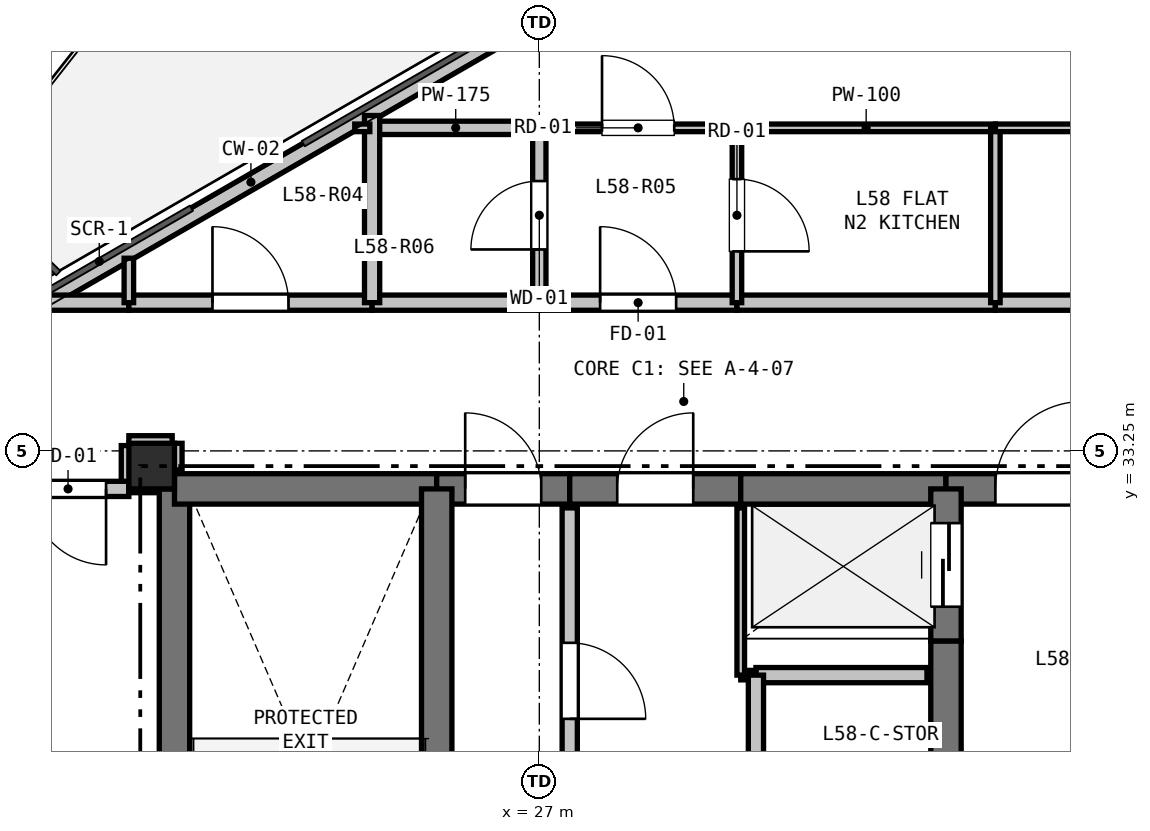
"""IFC4 building model, lengths in metres.
Left out: names, types, materials, properties, quantities, classifications, styles, units other than length and angle.
Written with IfcOpenShell. Run it as: python <this file> out.ifc"""

import sys

from ifc_helpers import new_model, si_unit, direction, frame, frame_2d, origin, origin_2d, place, context, subcontext, project, spatial, rectangle, extrude, element, fill, save


model = new_model("IFC4")
c1 = context("Model", 3, precision=1e-05, world=origin(), true_north=direction((0.0, 1.0)))
c2 = subcontext(c1, "Body", "Model", "MODEL_VIEW")
j1 = project(units=[si_unit("LENGTHUNIT", "METRE"), si_unit("PLANEANGLEUNIT", "RADIAN")], contexts=[c1])
p1 = place(None, origin())
s1 = spatial("IfcSite", under=j1, at=p1, CompositionType="ELEMENT")
p2 = place(p1, origin())
s2 = spatial("IfcBuilding", under=s1, at=p2, CompositionType="ELEMENT")
p3 = place(p2, frame((0.0, 0.0, 208.5)))
s3 = spatial("IfcBuildingStorey", under=s2, at=p3, CompositionType="ELEMENT", Elevation=208.5)
p4 = place(p3, frame((21.9, 33.05, 0.0), z_axis=(0.0, 0.0, 1.0), x_axis=(1.0, 0.0, 0.0)))
e1 = element("IfcColumn", 1, at=p4, inside=s3, PredefinedType="COLUMN", context=c2, shape_type="SweptSolid", body=[
    extrude(rectangle(XDim=0.6, YDim=0.6, at=origin_2d()), origin(), (0.0, 0.0, 1.0), 3.3),
])
p5 = place(p3, frame((19.309, 34.536, 0.0), z_axis=(0.0, 0.0, 1.0), x_axis=(0.866020680503, 0.500008180874, 0.0)))
e2 = element("IfcWall", 2, at=p5, inside=s3, PredefinedType="PARAPET", context=c2, shape_type="SweptSolid", body=[
    extrude(rectangle(XDim=8.999, YDim=0.2, at=frame_2d((4.5, 0.0))), origin(), (0.0, 0.0, 1.0), 0.2),
])
p6 = place(p3, frame((22.2, 25.4, 0.0), z_axis=(0.0, 0.0, 1.0), x_axis=(0.0, 1.0, 0.0)))
e3 = element("IfcWall", 3, at=p6, inside=s3, PredefinedType="SHEAR", context=c2, shape_type="SweptSolid", body=[
    extrude(rectangle(XDim=7.35, YDim=0.4, at=frame_2d((3.675, 0.0))), origin(), (0.0, 0.0, 1.0), 3.07),
])
p7 = place(p3, frame((22.2, 32.75, 0.0), z_axis=(0.0, 0.0, 1.0), x_axis=(1.0, 0.0, 0.0)))
e4 = element("IfcWall", 4, at=p7, inside=s3, PredefinedType="SHEAR", context=c2, shape_type="SweptSolid", body=[
    extrude(rectangle(XDim=3.45, YDim=0.4, at=frame_2d((1.725, 0.0))), origin(), (0.0, 0.0, 1.0), 3.07),
])
p8 = place(p3, frame((25.65, 32.75, 0.0), z_axis=(0.0, 0.0, 1.0), x_axis=(1.0, 0.0, 0.0)))
e5 = element("IfcWall", 5, at=p8, inside=s3, PredefinedType="SHEAR", context=c2, shape_type="SweptSolid", body=[
    extrude(rectangle(XDim=1.75, YDim=0.4, at=frame_2d((0.875, 0.0))), origin(), (0.0, 0.0, 1.0), 3.07),
])
p9 = place(p8, frame((0.375, 0.0, 0.0)))
e6 = element("IfcOpeningElement", 6, at=p9, cuts=e5, PredefinedType="OPENING", context=c2, shape_type="SweptSolid", body=[
    extrude(rectangle(XDim=1.0, YDim=2.15, at=frame_2d((0.5, 1.075))), frame((0.0, 0.21, 0.0), z_axis=(0.0, -1.0, 0.0), x_axis=(1.0, 0.0, 0.0)), (0.0, 0.0, 1.0), 0.42),
])
p10 = place(p3, frame((27.4, 32.75, 0.0), z_axis=(0.0, 0.0, 1.0), x_axis=(1.0, 0.0, 0.0)))
e7 = element("IfcWall", 7, at=p10, inside=s3, PredefinedType="SHEAR", context=c2, shape_type="SweptSolid", body=[
    extrude(rectangle(XDim=2.25, YDim=0.4, at=frame_2d((1.125, 0.0))), origin(), (0.0, 0.0, 1.0), 3.07),
])
p11 = place(p10, frame((0.625, 0.0, 0.0)))
e8 = element("IfcOpeningElement", 8, at=p11, cuts=e7, PredefinedType="OPENING", context=c2, shape_type="SweptSolid", body=[
    extrude(rectangle(XDim=1.0, YDim=2.15, at=frame_2d((0.5, 1.075))), frame((0.0, 0.21, 0.0), z_axis=(0.0, -1.0, 0.0), x_axis=(1.0, 0.0, 0.0)), (0.0, 0.0, 1.0), 0.42),
])
p12 = place(p3, frame((29.65, 32.75, 0.0), z_axis=(0.0, 0.0, 1.0), x_axis=(1.0, 0.0, 0.0)))
e9 = element("IfcWall", 9, at=p12, inside=s3, PredefinedType="SHEAR", context=c2, shape_type="SweptSolid", body=[
    extrude(rectangle(XDim=2.7, YDim=0.4, at=frame_2d((1.35, 0.0))), origin(), (0.0, 0.0, 1.0), 3.07),
])
p13 = place(p3, frame((32.35, 32.75, 0.0), z_axis=(0.0, 0.0, 1.0), x_axis=(1.0, 0.0, 0.0)))
e10 = element("IfcWall", 10, at=p13, inside=s3, PredefinedType="SHEAR", context=c2, shape_type="SweptSolid", body=[
    extrude(rectangle(XDim=3.45, YDim=0.4, at=frame_2d((1.725, 0.0))), origin(), (0.0, 0.0, 1.0), 3.07),
])
p14 = place(p13, frame((0.65, 0.0, 0.0)))
e11 = element("IfcOpeningElement", 11, at=p14, cuts=e10, PredefinedType="OPENING", context=c2, shape_type="SweptSolid", body=[
    extrude(rectangle(XDim=1.15, YDim=2.15, at=frame_2d((0.575, 1.075))), frame((0.0, 0.21, 0.0), z_axis=(0.0, -1.0, 0.0), x_axis=(1.0, 0.0, 0.0)), (0.0, 0.0, 1.0), 0.42),
])
p15 = place(p3, frame((25.65, 27.95, 0.0), z_axis=(0.0, 0.0, 1.0), x_axis=(0.0, 1.0, 0.0)))
e12 = element("IfcWall", 12, at=p15, inside=s3, PredefinedType="SHEAR", context=c2, shape_type="SweptSolid", body=[
    extrude(rectangle(XDim=4.8, YDim=0.4, at=frame_2d((2.4, 0.0))), origin(), (0.0, 0.0, 1.0), 3.07),
])
p16 = place(p3, frame((32.35, 27.95, 0.0), z_axis=(0.0, 0.0, 1.0), x_axis=(0.0, 1.0, 0.0)))
e13 = element("IfcWall", 13, at=p16, inside=s3, PredefinedType="SHEAR", context=c2, shape_type="SweptSolid", body=[
    extrude(rectangle(XDim=2.8, YDim=0.4, at=frame_2d((1.4, 0.0))), origin(), (0.0, 0.0, 1.0), 3.07),
])
p17 = place(p3, frame((32.35, 30.75, 0.0), z_axis=(0.0, 0.0, 1.0), x_axis=(0.0, 1.0, 0.0)))
e14 = element("IfcWall", 14, at=p17, inside=s3, PredefinedType="SHEAR", context=c2, shape_type="SweptSolid", body=[
    extrude(rectangle(XDim=2.0, YDim=0.4, at=frame_2d((1.0, 0.0))), origin(), (0.0, 0.0, 1.0), 3.07),
])
p18 = place(p17, frame((0.45, 0.0, 0.0)))
e15 = element("IfcOpeningElement", 15, at=p18, cuts=e14, PredefinedType="OPENING", context=c2, shape_type="SweptSolid", body=[
    extrude(rectangle(XDim=1.1, YDim=2.15, at=frame_2d((0.55, 1.075))), frame((0.0, 0.21, 0.0), z_axis=(0.0, -1.0, 0.0), x_axis=(1.0, 0.0, 0.0)), (0.0, 0.0, 1.0), 0.42),
])
p19 = place(p3, frame((32.1, 30.3, 0.0), z_axis=(0.0, 0.0, 1.0), x_axis=(-1.0, 0.0, 0.0)))
e16 = element("IfcWall", 16, at=p19, inside=s3, PredefinedType="PARTITIONING", context=c2, shape_type="SweptSolid", body=[
    extrude(rectangle(XDim=2.25, YDim=0.2, at=frame_2d((1.125, 0.0))), origin(), (0.0, 0.0, 1.0), 3.07),
])
p20 = place(p3, frame((29.85, 30.3, 0.0), z_axis=(0.0, 0.0, 1.0), x_axis=(-1.0, 0.0, 0.0)))
e17 = element("IfcWall", 17, at=p20, inside=s3, PredefinedType="PARTITIONING", context=c2, shape_type="SweptSolid", body=[
    extrude(rectangle(XDim=0.2, YDim=0.125, at=frame_2d((0.1, 0.0))), origin(), (0.0, 0.0, 1.0), 3.07),
])
p21 = place(p3, frame((29.65, 30.3, 0.0), z_axis=(0.0, 0.0, 1.0), x_axis=(0.0, 1.0, 0.0)))
e18 = element("IfcWall", 18, at=p21, inside=s3, PredefinedType="PARTITIONING", context=c2, shape_type="SweptSolid", body=[
    extrude(rectangle(XDim=2.2, YDim=0.1, at=frame_2d((1.1, 0.0))), origin(), (0.0, 0.0, 1.0), 3.07),
])
p22 = place(p3, frame((27.4, 32.5, 0.0), z_axis=(0.0, 0.0, 1.0), x_axis=(0.0, -1.0, 0.0)))
e19 = element("IfcWall", 19, at=p22, inside=s3, PredefinedType="PARTITIONING", context=c2, shape_type="SweptSolid", body=[
    extrude(rectangle(XDim=4.55, YDim=0.2, at=frame_2d((2.275, 0.0))), origin(), (0.0, 0.0, 1.0), 3.07),
])
p23 = place(p22, frame((1.775, 0.0, 0.0)))
e20 = element("IfcOpeningElement", 20, at=p23, cuts=e19, PredefinedType="OPENING", context=c2, shape_type="SweptSolid", body=[
    extrude(rectangle(XDim=1.0, YDim=2.15, at=frame_2d((0.5, 1.075))), frame((0.0, 0.11, 0.0), z_axis=(0.0, -1.0, 0.0), x_axis=(1.0, 0.0, 0.0)), (0.0, 0.0, 1.0), 0.22),
])
p24 = place(p3, frame((22.2, 33.0, 0.0), z_axis=(0.0, 0.0, 1.0), x_axis=(0.0, 1.0, 0.0)))
e21 = element("IfcWall", 21, at=p24, inside=s3, PredefinedType="PARTITIONING", context=c2, shape_type="SweptSolid", body=[
    extrude(rectangle(XDim=0.35, YDim=0.2, at=frame_2d((0.175, 0.0))), origin(), (0.0, 0.0, 1.0), 2.595),
])
p25 = place(p3, frame((22.17, 33.35, 0.0), z_axis=(0.0, 0.0, 1.0), x_axis=(-1.0, 0.0, 0.0)))
e22 = element("IfcWall", 22, at=p25, inside=s3, PredefinedType="PARTITIONING", context=c2, shape_type="SweptSolid", body=[
    extrude(rectangle(XDim=0.57, YDim=0.2, at=frame_2d((0.285, 0.0))), origin(), (0.0, 0.0, 1.0), 3.07),
])
p26 = place(p3, frame((21.6, 33.32, 0.0), z_axis=(0.0, 0.0, 1.0), x_axis=(0.0, -1.0, 0.0)))
e23 = element("IfcWall", 23, at=p26, inside=s3, PredefinedType="PARTITIONING", context=c2, shape_type="SweptSolid", body=[
    extrude(rectangle(XDim=0.57, YDim=0.2, at=frame_2d((0.285, 0.0))), origin(), (0.0, 0.0, 1.0), 2.518),
])
p27 = place(p3, frame((21.6, 32.75, 0.0), z_axis=(0.0, 0.0, 1.0), x_axis=(-1.0, 0.0, 0.0)))
e24 = element("IfcWall", 24, at=p27, inside=s3, PredefinedType="PARTITIONING", context=c2, shape_type="SweptSolid", body=[
    extrude(rectangle(XDim=1.6, YDim=0.2, at=frame_2d((0.8, 0.0))), origin(), (0.0, 0.0, 1.0), 2.518),
])
p28 = place(p27, frame((0.3, 0.0, 0.0)))
e25 = element("IfcOpeningElement", 25, at=p28, cuts=e24, PredefinedType="OPENING", context=c2, shape_type="SweptSolid", body=[
    extrude(rectangle(XDim=1.0, YDim=2.15, at=frame_2d((0.5, 1.075))), frame((0.0, 0.11, 0.0), z_axis=(0.0, -1.0, 0.0), x_axis=(1.0, 0.0, 0.0)), (0.0, 0.0, 1.0), 0.22),
])
p29 = place(p3, frame((20.528, 35.2, 0.0), z_axis=(0.0, 0.0, 1.0), x_axis=(1.0, 0.0, 0.0)))
e26 = element("IfcWall", 26, at=p29, inside=s3, PredefinedType="PARTITIONING", context=c2, shape_type="SweptSolid", body=[
    extrude(rectangle(XDim=1.072, YDim=0.2, at=frame_2d((0.536, 0.0))), origin(), (0.0, 0.0, 1.0), 2.365),
])
p30 = place(p3, frame((21.6, 35.2, 0.0), z_axis=(0.0, 0.0, 1.0), x_axis=(1.0, 0.0, 0.0)))
e27 = element("IfcWall", 27, at=p30, inside=s3, PredefinedType="PARTITIONING", context=c2, shape_type="SweptSolid", body=[
    extrude(rectangle(XDim=3.2, YDim=0.2, at=frame_2d((1.6, 0.0))), origin(), (0.0, 0.0, 1.0), 2.365),
])
p31 = place(p30, frame((1.1, 0.0, 0.0)))
e28 = element("IfcOpeningElement", 28, at=p31, cuts=e27, PredefinedType="OPENING", context=c2, shape_type="SweptSolid", body=[
    extrude(rectangle(XDim=1.0, YDim=2.15, at=frame_2d((0.5, 1.075))), frame((0.0, 0.11, 0.0), z_axis=(0.0, -1.0, 0.0), x_axis=(1.0, 0.0, 0.0)), (0.0, 0.0, 1.0), 0.22),
])
p32 = place(p3, frame((24.8, 35.2, 0.0), z_axis=(0.0, 0.0, 1.0), x_axis=(1.0, 0.0, 0.0)))
e29 = element("IfcWall", 29, at=p32, inside=s3, PredefinedType="PARTITIONING", context=c2, shape_type="SweptSolid", body=[
    extrude(rectangle(XDim=2.2, YDim=0.2, at=frame_2d((1.1, 0.0))), origin(), (0.0, 0.0, 1.0), 3.07),
])
p33 = place(p3, frame((27.0, 35.2, 0.0), z_axis=(0.0, 0.0, 1.0), x_axis=(1.0, 0.0, 0.0)))
e30 = element("IfcWall", 30, at=p33, inside=s3, PredefinedType="PARTITIONING", context=c2, shape_type="SweptSolid", body=[
    extrude(rectangle(XDim=2.6, YDim=0.2, at=frame_2d((1.3, 0.0))), origin(), (0.0, 0.0, 1.0), 3.07),
])
p34 = place(p33, frame((0.8, 0.0, 0.0)))
e31 = element("IfcOpeningElement", 31, at=p34, cuts=e30, PredefinedType="OPENING", context=c2, shape_type="SweptSolid", body=[
    extrude(rectangle(XDim=1.0, YDim=2.15, at=frame_2d((0.5, 1.075))), frame((0.0, 0.11, 0.0), z_axis=(0.0, -1.0, 0.0), x_axis=(1.0, 0.0, 0.0)), (0.0, 0.0, 1.0), 0.22),
])
p35 = place(p3, frame((29.6, 35.2, 0.0), z_axis=(0.0, 0.0, 1.0), x_axis=(1.0, 0.0, 0.0)))
e32 = element("IfcWall", 32, at=p35, inside=s3, PredefinedType="PARTITIONING", context=c2, shape_type="SweptSolid", body=[
    extrude(rectangle(XDim=3.4, YDim=0.2, at=frame_2d((1.7, 0.0))), origin(), (0.0, 0.0, 1.0), 3.07),
])
p36 = place(p3, frame((33.0, 35.2, 0.0), z_axis=(0.0, 0.0, 1.0), x_axis=(1.0, 0.0, 0.0)))
e33 = element("IfcWall", 33, at=p36, inside=s3, PredefinedType="PARTITIONING", context=c2, shape_type="SweptSolid", body=[
    extrude(rectangle(XDim=1.5, YDim=0.2, at=frame_2d((0.75, 0.0))), origin(), (0.0, 0.0, 1.0), 3.07),
])
p37 = place(p3, frame((27.0, 37.5, 0.0), z_axis=(0.0, 0.0, 1.0), x_axis=(1.0, 0.0, 0.0)))
e34 = element("IfcWall", 34, at=p37, inside=s3, PredefinedType="PARTITIONING", context=c2, shape_type="SweptSolid", body=[
    extrude(rectangle(XDim=2.6, YDim=0.1, at=frame_2d((1.3, 0.0))), origin(), (0.0, 0.0, 1.0), 3.07),
])
p38 = place(p37, frame((0.825, 0.0, 0.0)))
e35 = element("IfcOpeningElement", 35, at=p38, cuts=e34, PredefinedType="OPENING", context=c2, shape_type="SweptSolid", body=[
    extrude(rectangle(XDim=0.95, YDim=2.1, at=frame_2d((0.475, 1.05))), frame((0.0, 0.06, 0.0), z_axis=(0.0, -1.0, 0.0), x_axis=(1.0, 0.0, 0.0)), (0.0, 0.0, 1.0), 0.12),
])
p39 = place(p3, frame((29.6, 37.5, 0.0), z_axis=(0.0, 0.0, 1.0), x_axis=(0.0, -1.0, 0.0)))
e36 = element("IfcWall", 36, at=p39, inside=s3, PredefinedType="PARTITIONING", context=c2, shape_type="SweptSolid", body=[
    extrude(rectangle(XDim=2.3, YDim=0.125, at=frame_2d((1.15, 0.0))), origin(), (0.0, 0.0, 1.0), 3.07),
])
p40 = place(p39, frame((0.675, 0.0, 0.0)))
e37 = element("IfcOpeningElement", 37, at=p40, cuts=e36, PredefinedType="OPENING", context=c2, shape_type="SweptSolid", body=[
    extrude(rectangle(XDim=0.95, YDim=2.1, at=frame_2d((0.475, 1.05))), frame((0.0, 0.073, 0.0), z_axis=(0.0, -1.0, 0.0), x_axis=(1.0, 0.0, 0.0)), (0.0, 0.0, 1.0), 0.145),
])
p41 = place(p3, frame((27.0, 35.2, 0.0), z_axis=(0.0, 0.0, 1.0), x_axis=(0.0, 1.0, 0.0)))
e38 = element("IfcWall", 38, at=p41, inside=s3, PredefinedType="PLUMBINGWALL", context=c2, shape_type="SweptSolid", body=[
    extrude(rectangle(XDim=2.3, YDim=0.175, at=frame_2d((1.15, 0.0))), origin(), (0.0, 0.0, 1.0), 3.07),
])
p42 = place(p41, frame((0.7, 0.0, 0.0)))
e39 = element("IfcOpeningElement", 39, at=p42, cuts=e38, PredefinedType="OPENING", context=c2, shape_type="SweptSolid", body=[
    extrude(rectangle(XDim=0.9, YDim=2.1, at=frame_2d((0.45, 1.05))), frame((0.0, 0.097, 0.0), z_axis=(0.0, -1.0, 0.0), x_axis=(1.0, 0.0, 0.0)), (0.0, 0.0, 1.0), 0.195),
])
p43 = place(p3, frame((24.8, 37.5, 0.0), z_axis=(0.0, 0.0, 1.0), x_axis=(1.0, 0.0, 0.0)))
e40 = element("IfcWall", 40, at=p43, inside=s3, PredefinedType="PLUMBINGWALL", context=c2, shape_type="SweptSolid", body=[
    extrude(rectangle(XDim=2.2, YDim=0.175, at=frame_2d((1.1, 0.0))), origin(), (0.0, 0.0, 1.0), 2.365),
])
p44 = place(p3, frame((24.8, 35.2, 0.0), z_axis=(0.0, 0.0, 1.0), x_axis=(0.0, 1.0, 0.0)))
e41 = element("IfcWall", 41, at=p44, inside=s3, PredefinedType="PARTITIONING", context=c2, shape_type="SweptSolid", body=[
    extrude(rectangle(XDim=2.462, YDim=0.2, at=frame_2d((1.231, 0.0))), origin(), (0.0, 0.0, 1.0), 2.365),
])
p45 = place(p3, frame((29.6, 37.5, 0.0), z_axis=(0.0, 0.0, 1.0), x_axis=(1.0, 0.0, 0.0)))
e42 = element("IfcWall", 42, at=p45, inside=s3, PredefinedType="PARTITIONING", context=c2, shape_type="SweptSolid", body=[
    extrude(rectangle(XDim=3.4, YDim=0.1, at=frame_2d((1.7, 0.0))), origin(), (0.0, 0.0, 1.0), 3.07),
])
p46 = place(p3, frame((33.0, 37.5, 0.0), z_axis=(0.0, 0.0, 1.0), x_axis=(0.0, -1.0, 0.0)))
e43 = element("IfcWall", 43, at=p46, inside=s3, PredefinedType="PARTITIONING", context=c2, shape_type="SweptSolid", body=[
    extrude(rectangle(XDim=2.3, YDim=0.125, at=frame_2d((1.15, 0.0))), origin(), (0.0, 0.0, 1.0), 3.07),
])
p47 = place(p3, frame((29.85, 30.3, 0.0), z_axis=(0.0, 0.0, 1.0), x_axis=(0.0, -1.0, 0.0)))
e44 = element("IfcWall", 44, at=p47, inside=s3, PredefinedType="PARTITIONING", context=c2, shape_type="SweptSolid", body=[
    extrude(rectangle(XDim=2.35, YDim=0.2, at=frame_2d((1.175, 0.0))), origin(), (0.0, 0.0, 1.0), 3.07),
])
p48 = place(p3, frame((21.6, 32.75, 0.0), z_axis=(0.0, 0.0, 1.0), x_axis=(1.0, 0.0, 0.0)))
e45 = element("IfcWall", 45, at=p48, inside=s3, PredefinedType="PARTITIONING", context=c2, shape_type="SweptSolid", body=[
    extrude(rectangle(XDim=0.35, YDim=0.1, at=frame_2d((0.175, 0.0))), origin(), (0.0, 0.0, 1.0), 2.595),
])
p49 = place(p3, frame((24.572, 37.5, 0.0), z_axis=(0.0, 0.0, 1.0), x_axis=(1.0, 0.0, 0.0)))
e46 = element("IfcWall", 46, at=p49, inside=s3, PredefinedType="PARTITIONING", context=c2, shape_type="SweptSolid", body=[
    extrude(rectangle(XDim=0.198, YDim=0.1, at=frame_2d((0.099, 0.0))), origin(), (0.0, 0.0, 1.0), 3.07),
])
p50 = place(p3, frame((21.6, 35.2, 0.0), z_axis=(0.0, 0.0, 1.0), x_axis=(0.0, 1.0, 0.0)))
e47 = element("IfcWall", 47, at=p50, inside=s3, PredefinedType="PARTITIONING", context=c2, shape_type="SweptSolid", body=[
    extrude(rectangle(XDim=0.585, YDim=0.125, at=frame_2d((0.292, 0.0))), origin(), (0.0, 0.0, 1.0), 2.365),
])
p51 = place(p3, frame((34.5, 37.5, 0.0), z_axis=(0.0, 0.0, 1.0), x_axis=(-1.0, 0.0, 0.0)))
e48 = element("IfcWall", 48, at=p51, inside=s3, PredefinedType="PARTITIONING", context=c2, shape_type="SweptSolid", body=[
    extrude(rectangle(XDim=1.5, YDim=0.1, at=frame_2d((0.75, 0.0))), origin(), (0.0, 0.0, 1.0), 3.07),
])
p52 = place(p9, origin())
e49 = element("IfcDoor", 49, at=p52, inside=s3, OperationType="SINGLE_SWING_LEFT", PredefinedType="DOOR", context=c2, shape_type="SweptSolid", body=[
    extrude(rectangle(XDim=1.0, YDim=2.15, at=frame_2d((0.5, 1.075))), frame((0.0, 0.025, 0.0), z_axis=(0.0, -1.0, 0.0), x_axis=(1.0, 0.0, 0.0)), (0.0, 0.0, 1.0), 0.05),
])
fill(e6, e49)
p53 = place(p18, origin())
e50 = element("IfcDoor", 50, at=p53, inside=s3, OperationType="SLIDING_TO_LEFT", PredefinedType="DOOR", context=c2, shape_type="SweptSolid", body=[
    extrude(rectangle(XDim=1.1, YDim=2.15, at=frame_2d((0.55, 1.075))), frame((0.0, 0.025, 0.0), z_axis=(0.0, -1.0, 0.0), x_axis=(1.0, 0.0, 0.0)), (0.0, 0.0, 1.0), 0.05),
])
fill(e15, e50)
p54 = place(p14, origin())
e51 = element("IfcDoor", 51, at=p54, inside=s3, OperationType="SINGLE_SWING_RIGHT", PredefinedType="DOOR", context=c2, shape_type="SweptSolid", body=[
    extrude(rectangle(XDim=1.15, YDim=2.15, at=frame_2d((0.575, 1.075))), frame((0.0, 0.025, 0.0), z_axis=(0.0, -1.0, 0.0), x_axis=(1.0, 0.0, 0.0)), (0.0, 0.0, 1.0), 0.05),
])
fill(e11, e51)
p55 = place(p23, origin())
e52 = element("IfcDoor", 52, at=p55, inside=s3, OperationType="SINGLE_SWING_RIGHT", PredefinedType="DOOR", context=c2, shape_type="SweptSolid", body=[
    extrude(rectangle(XDim=1.0, YDim=2.15, at=frame_2d((0.5, 1.075))), frame((0.0, 0.025, 0.0), z_axis=(0.0, -1.0, 0.0), x_axis=(1.0, 0.0, 0.0)), (0.0, 0.0, 1.0), 0.05),
])
fill(e20, e52)
p56 = place(p34, origin())
e53 = element("IfcDoor", 53, at=p56, inside=s3, OperationType="SINGLE_SWING_LEFT", PredefinedType="DOOR", context=c2, shape_type="SweptSolid", body=[
    extrude(rectangle(XDim=1.0, YDim=2.15, at=frame_2d((0.5, 1.075))), frame((0.0, 0.025, 0.0), z_axis=(0.0, -1.0, 0.0), x_axis=(1.0, 0.0, 0.0)), (0.0, 0.0, 1.0), 0.05),
])
fill(e31, e53)
p57 = place(p11, origin())
e54 = element("IfcDoor", 54, at=p57, inside=s3, OperationType="SINGLE_SWING_RIGHT", PredefinedType="DOOR", context=c2, shape_type="SweptSolid", body=[
    extrude(rectangle(XDim=1.0, YDim=2.15, at=frame_2d((0.5, 1.075))), frame((0.0, 0.025, 0.0), z_axis=(0.0, -1.0, 0.0), x_axis=(1.0, 0.0, 0.0)), (0.0, 0.0, 1.0), 0.05),
])
fill(e8, e54)
p58 = place(p28, origin())
e55 = element("IfcDoor", 55, at=p58, inside=s3, OperationType="SINGLE_SWING_LEFT", PredefinedType="DOOR", context=c2, shape_type="SweptSolid", body=[
    extrude(rectangle(XDim=1.0, YDim=2.15, at=frame_2d((0.5, 1.075))), frame((0.0, 0.025, 0.0), z_axis=(0.0, -1.0, 0.0), x_axis=(1.0, 0.0, 0.0)), (0.0, 0.0, 1.0), 0.05),
])
fill(e25, e55)
p59 = place(p31, origin())
e56 = element("IfcDoor", 56, at=p59, inside=s3, OperationType="SINGLE_SWING_LEFT", PredefinedType="DOOR", context=c2, shape_type="SweptSolid", body=[
    extrude(rectangle(XDim=1.0, YDim=2.15, at=frame_2d((0.5, 1.075))), frame((0.0, 0.025, 0.0), z_axis=(0.0, -1.0, 0.0), x_axis=(1.0, 0.0, 0.0)), (0.0, 0.0, 1.0), 0.05),
])
fill(e28, e56)
p60 = place(p42, origin())
e57 = element("IfcDoor", 57, at=p60, inside=s3, OperationType="SINGLE_SWING_LEFT", PredefinedType="DOOR", context=c2, shape_type="SweptSolid", body=[
    extrude(rectangle(XDim=0.9, YDim=2.1, at=frame_2d((0.45, 1.05))), frame((0.0, 0.025, 0.0), z_axis=(0.0, -1.0, 0.0), x_axis=(1.0, 0.0, 0.0)), (0.0, 0.0, 1.0), 0.05),
])
fill(e39, e57)
p61 = place(p40, origin())
e58 = element("IfcDoor", 58, at=p61, inside=s3, OperationType="SINGLE_SWING_RIGHT", PredefinedType="DOOR", context=c2, shape_type="SweptSolid", body=[
    extrude(rectangle(XDim=0.95, YDim=2.1, at=frame_2d((0.475, 1.05))), frame((0.0, 0.025, 0.0), z_axis=(0.0, -1.0, 0.0), x_axis=(1.0, 0.0, 0.0)), (0.0, 0.0, 1.0), 0.05),
])
fill(e37, e58)
p62 = place(p38, origin())
e59 = element("IfcDoor", 59, at=p62, inside=s3, OperationType="SINGLE_SWING_LEFT", PredefinedType="DOOR", context=c2, shape_type="SweptSolid", body=[
    extrude(rectangle(XDim=0.95, YDim=2.1, at=frame_2d((0.475, 1.05))), frame((0.0, 0.025, 0.0), z_axis=(0.0, -1.0, 0.0), x_axis=(1.0, 0.0, 0.0)), (0.0, 0.0, 1.0), 0.05),
])
fill(e35, e59)
save(model, sys.argv[1])
